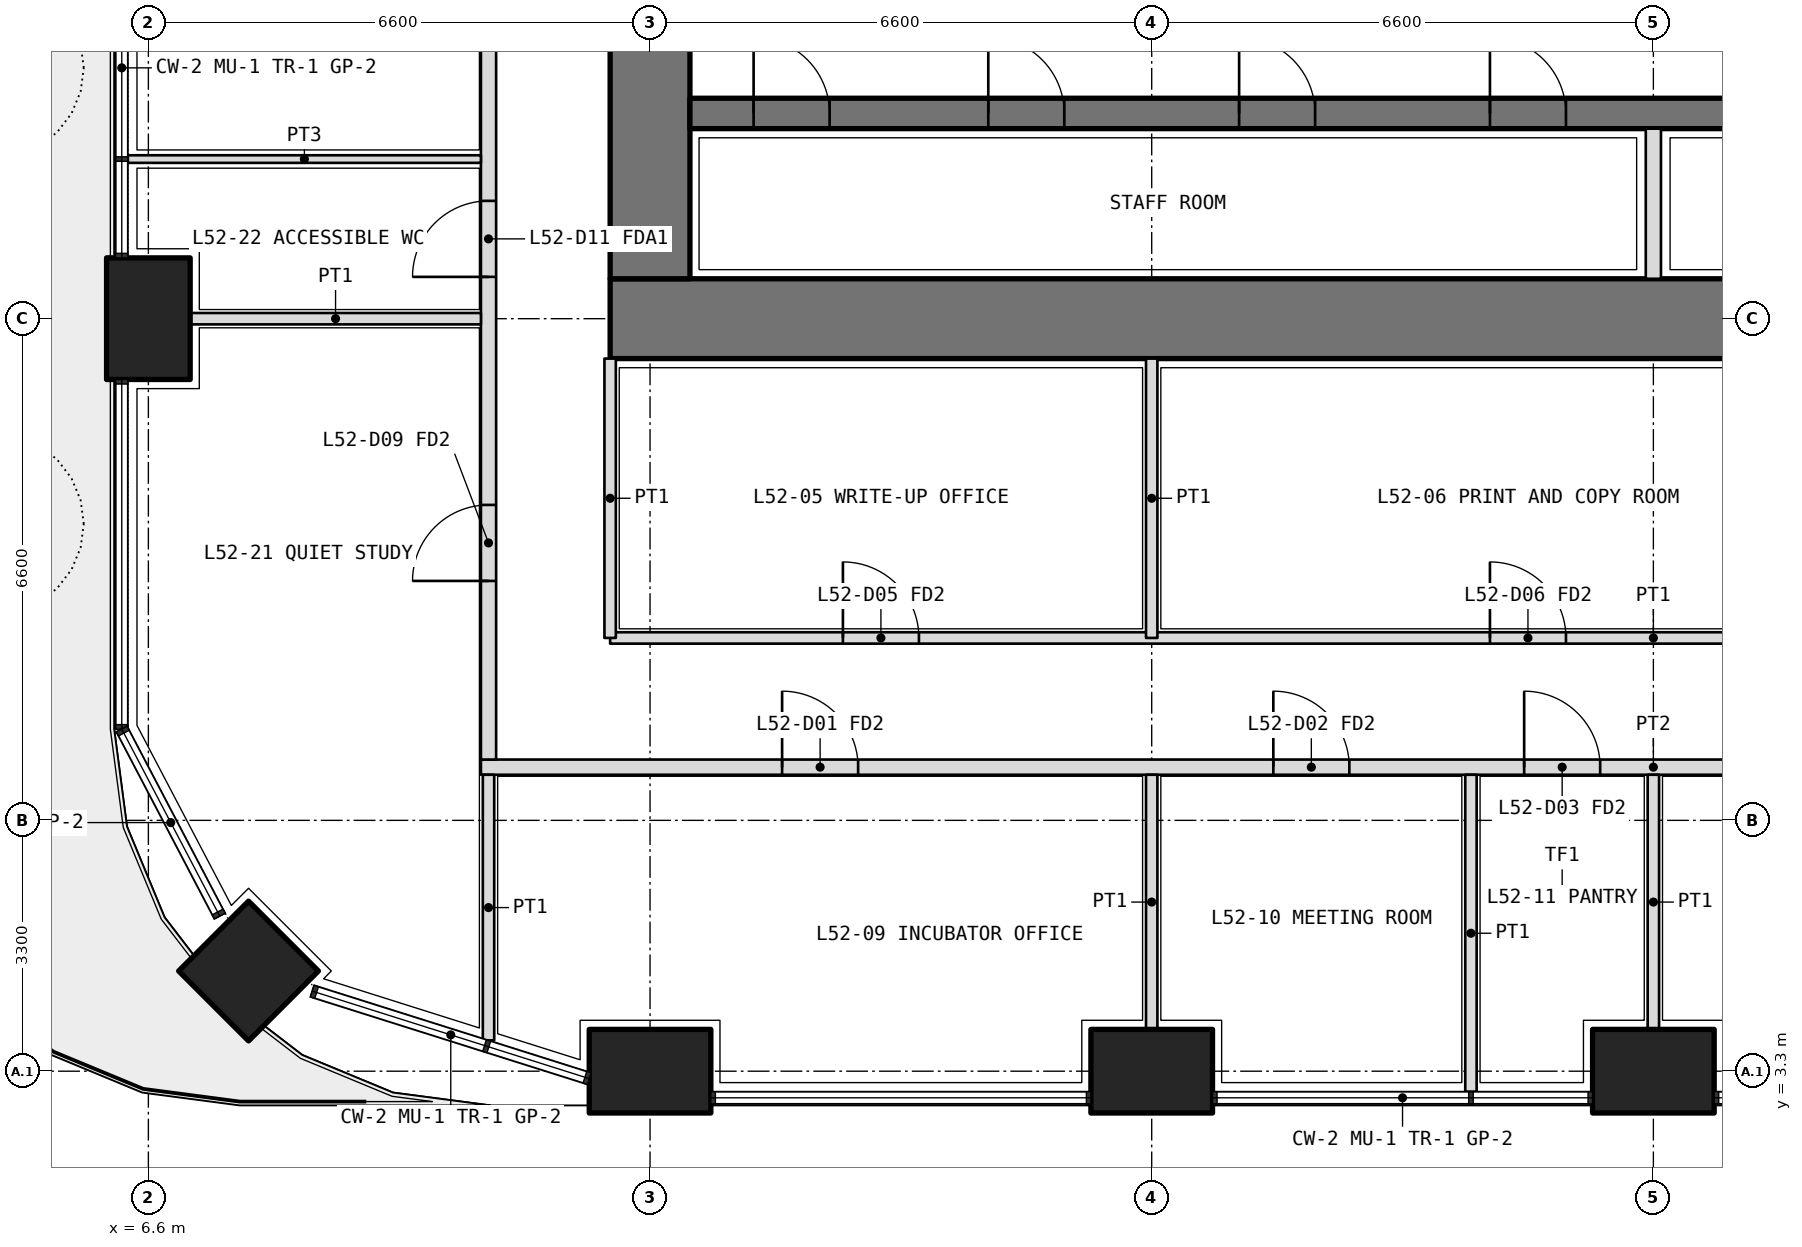
"""IFC4 building model, lengths in metres.
Left out: names, types, materials, properties, quantities, classifications, styles, units other than length and angle.
Written with IfcOpenShell. Run it as: python <this file> out.ifc"""

import sys

from ifc_helpers import new_model, si_unit, direction, frame, frame_2d, origin, origin_2d, place, context, subcontext, project, spatial, rectangle, extrude, element, fill, save


model = new_model("IFC4")
c1 = context("Model", 3, precision=1e-05, world=origin(), true_north=direction((0.0, 1.0)))
c2 = subcontext(c1, "Body", "Model", "MODEL_VIEW")
j1 = project(units=[si_unit("LENGTHUNIT", "METRE"), si_unit("PLANEANGLEUNIT", "RADIAN")], contexts=[c1])
p1 = place(None, origin())
s1 = spatial("IfcSite", under=j1, at=p1, CompositionType="ELEMENT")
p2 = place(p1, origin())
s2 = spatial("IfcBuilding", under=s1, at=p2, CompositionType="ELEMENT")
p3 = place(p2, frame((0.0, 0.0, 229.2)))
s3 = spatial("IfcBuildingStorey", under=s2, at=p3, CompositionType="ELEMENT", Elevation=229.2)
p4 = place(p3, frame((7.918, 4.618, 0.0), z_axis=(0.0, 0.0, 1.0), x_axis=(0.707106781187, 0.707106781187, 0.0)))
e1 = element("IfcColumn", 1, at=p4, inside=s3, PredefinedType="COLUMN", context=c2, shape_type="SweptSolid", body=[
    extrude(rectangle(XDim=1.3, YDim=1.3, at=origin_2d()), origin(), (0.0, 0.0, 1.0), 4.2),
])
for number, where, z_axis, x_axis in (
    (2, (13.2, 3.3, 0.0), (0.0, 0.0, 1.0), (1.0, 0.0, 0.0)),
    (3, (19.8, 3.3, 0.0), (0.0, 0.0, 1.0), (1.0, 0.0, 0.0)),
    (4, (26.4, 3.3, 0.0), (0.0, 0.0, 1.0), (1.0, 0.0, 0.0)),
    (5, (6.6, 13.2, 0.0), (0.0, 0.0, 1.0), (0.0, 1.0, 0.0)),
):
    element("IfcColumn", number, at=place(p3, frame(where, z_axis=z_axis, x_axis=x_axis)), inside=s3, PredefinedType="COLUMN", context=c2, shape_type="SweptSolid", body=[
        extrude(rectangle(XDim=1.6, YDim=1.1, at=origin_2d()), origin(), (0.0, 0.0, 1.0), 4.2),
    ])
p5 = place(p3, frame((12.675, 13.2, 0.0), z_axis=(0.0, 0.0, 1.0), x_axis=(1.0, 0.0, 0.0)))
e6 = element("IfcWall", 6, at=p5, inside=s3, PredefinedType="SHEAR", context=c2, shape_type="SweptSolid", body=[
    extrude(rectangle(XDim=27.45, YDim=1.05, at=frame_2d((13.725, 0.0))), origin(), (0.0, 0.0, 1.0), 4.2),
])
p6 = place(p3, frame((13.2, 32.475, 0.0), z_axis=(0.0, 0.0, 1.0), x_axis=(0.0, -1.0, 0.0)))
e7 = element("IfcWall", 7, at=p6, inside=s3, PredefinedType="SHEAR", context=c2, shape_type="SweptSolid", body=[
    extrude(rectangle(XDim=18.75, YDim=1.05, at=frame_2d((9.375, 0.0))), origin(), (0.0, 0.0, 1.0), 4.2),
])
p7 = place(p6, frame((14.125, 0.0, 0.0)))
e8 = element("IfcOpeningElement", 8, at=p7, cuts=e7, PredefinedType="OPENING", context=c2, shape_type="SweptSolid", body=[
    extrude(rectangle(XDim=1.6, YDim=2.1, at=frame_2d((0.8, 1.05))), frame((0.0, 0.535, 0.0), z_axis=(0.0, -1.0, 0.0), x_axis=(1.0, 0.0, 0.0)), (0.0, 0.0, 1.0), 1.07),
])
p8 = place(p6, frame((3.325, 0.0, 0.0)))
e9 = element("IfcOpeningElement", 9, at=p8, cuts=e7, PredefinedType="OPENING", context=c2, shape_type="SweptSolid", body=[
    extrude(rectangle(XDim=1.6, YDim=2.1, at=frame_2d((0.8, 1.05))), frame((0.0, 0.535, 0.0), z_axis=(0.0, -1.0, 0.0), x_axis=(1.0, 0.0, 0.0)), (0.0, 0.0, 1.0), 1.07),
])
p9 = place(p3, frame((13.725, 15.9, 0.0), z_axis=(0.0, 0.0, 1.0), x_axis=(1.0, 0.0, 0.0)))
e10 = element("IfcWall", 10, at=p9, inside=s3, PredefinedType="SHEAR", context=c2, shape_type="SweptSolid", body=[
    extrude(rectangle(XDim=25.35, YDim=0.4, at=frame_2d((12.675, 0.0))), origin(), (0.0, 0.0, 1.0), 4.2),
])
p10 = place(p9, frame((0.837, 0.0, 0.0)))
e11 = element("IfcOpeningElement", 11, at=p10, cuts=e10, PredefinedType="OPENING", context=c2, shape_type="SweptSolid", body=[
    extrude(rectangle(XDim=1.0, YDim=2.1, at=frame_2d((0.5, 1.05))), frame((0.0, 0.21, 0.0), z_axis=(0.0, -1.0, 0.0), x_axis=(1.0, 0.0, 0.0)), (0.0, 0.0, 1.0), 0.42),
])
p11 = place(p9, frame((3.925, 0.0, 0.0)))
e12 = element("IfcOpeningElement", 12, at=p11, cuts=e10, PredefinedType="OPENING", context=c2, shape_type="SweptSolid", body=[
    extrude(rectangle(XDim=1.0, YDim=2.1, at=frame_2d((0.5, 1.05))), frame((0.0, 0.21, 0.0), z_axis=(0.0, -1.0, 0.0), x_axis=(1.0, 0.0, 0.0)), (0.0, 0.0, 1.0), 0.42),
])
p12 = place(p9, frame((7.225, 0.0, 0.0)))
e13 = element("IfcOpeningElement", 13, at=p12, cuts=e10, PredefinedType="OPENING", context=c2, shape_type="SweptSolid", body=[
    extrude(rectangle(XDim=1.0, YDim=2.1, at=frame_2d((0.5, 1.05))), frame((0.0, 0.21, 0.0), z_axis=(0.0, -1.0, 0.0), x_axis=(1.0, 0.0, 0.0)), (0.0, 0.0, 1.0), 0.42),
])
p13 = place(p9, frame((10.525, 0.0, 0.0)))
e14 = element("IfcOpeningElement", 14, at=p13, cuts=e10, PredefinedType="OPENING", context=c2, shape_type="SweptSolid", body=[
    extrude(rectangle(XDim=1.0, YDim=2.1, at=frame_2d((0.5, 1.05))), frame((0.0, 0.21, 0.0), z_axis=(0.0, -1.0, 0.0), x_axis=(1.0, 0.0, 0.0)), (0.0, 0.0, 1.0), 0.42),
])
p14 = place(p9, frame((13.825, 0.0, 0.0)))
e15 = element("IfcOpeningElement", 15, at=p14, cuts=e10, PredefinedType="OPENING", context=c2, shape_type="SweptSolid", body=[
    extrude(rectangle(XDim=1.0, YDim=2.1, at=frame_2d((0.5, 1.05))), frame((0.0, 0.21, 0.0), z_axis=(0.0, -1.0, 0.0), x_axis=(1.0, 0.0, 0.0)), (0.0, 0.0, 1.0), 0.42),
])
p15 = place(p9, frame((17.125, 0.0, 0.0)))
e16 = element("IfcOpeningElement", 16, at=p15, cuts=e10, PredefinedType="OPENING", context=c2, shape_type="SweptSolid", body=[
    extrude(rectangle(XDim=1.0, YDim=2.1, at=frame_2d((0.5, 1.05))), frame((0.0, 0.21, 0.0), z_axis=(0.0, -1.0, 0.0), x_axis=(1.0, 0.0, 0.0)), (0.0, 0.0, 1.0), 0.42),
])
p16 = place(p9, frame((20.425, 0.0, 0.0)))
e17 = element("IfcOpeningElement", 17, at=p16, cuts=e10, PredefinedType="OPENING", context=c2, shape_type="SweptSolid", body=[
    extrude(rectangle(XDim=1.0, YDim=2.1, at=frame_2d((0.5, 1.05))), frame((0.0, 0.21, 0.0), z_axis=(0.0, -1.0, 0.0), x_axis=(1.0, 0.0, 0.0)), (0.0, 0.0, 1.0), 0.42),
])
p17 = place(p9, frame((23.512, 0.0, 0.0)))
e18 = element("IfcOpeningElement", 18, at=p17, cuts=e10, PredefinedType="OPENING", context=c2, shape_type="SweptSolid", body=[
    extrude(rectangle(XDim=1.0, YDim=2.1, at=frame_2d((0.5, 1.05))), frame((0.0, 0.21, 0.0), z_axis=(0.0, -1.0, 0.0), x_axis=(1.0, 0.0, 0.0)), (0.0, 0.0, 1.0), 0.42),
])
p18 = place(p3, frame((26.4, 13.725, 0.0), z_axis=(0.0, 0.0, 1.0), x_axis=(0.0, 1.0, 0.0)))
e19 = element("IfcWall", 19, at=p18, inside=s3, PredefinedType="PARTITIONING", context=c2, shape_type="SweptSolid", body=[
    extrude(rectangle(XDim=1.975, YDim=0.2, at=frame_2d((0.987, 0.0))), origin(), (0.0, 0.0, 1.0), 4.2),
])
p19 = place(p3, frame((12.675, 9.0, 0.0), z_axis=(0.0, 0.0, 1.0), x_axis=(1.0, 0.0, 0.0)))
e20 = element("IfcWall", 20, at=p19, inside=s3, PredefinedType="PARTITIONING", context=c2, shape_type="SweptSolid", body=[
    extrude(rectangle(XDim=27.45, YDim=0.15, at=frame_2d((13.725, 0.0))), origin(), (0.0, 0.0, 1.0), 3.0),
])
p20 = place(p19, frame((3.062, 0.0, 0.0)))
e21 = element("IfcOpeningElement", 21, at=p20, cuts=e20, PredefinedType="OPENING", context=c2, shape_type="SweptSolid", body=[
    extrude(rectangle(XDim=1.0, YDim=2.1, at=frame_2d((0.5, 1.05))), frame((0.0, 0.085, 0.0), z_axis=(0.0, -1.0, 0.0), x_axis=(1.0, 0.0, 0.0)), (0.0, 0.0, 1.0), 0.17),
])
p21 = place(p19, frame((11.575, 0.0, 0.0)))
e22 = element("IfcOpeningElement", 22, at=p21, cuts=e20, PredefinedType="OPENING", context=c2, shape_type="SweptSolid", body=[
    extrude(rectangle(XDim=1.0, YDim=2.1, at=frame_2d((0.5, 1.05))), frame((0.0, 0.085, 0.0), z_axis=(0.0, -1.0, 0.0), x_axis=(1.0, 0.0, 0.0)), (0.0, 0.0, 1.0), 0.17),
])
p22 = place(p19, frame((19.825, 0.0, 0.0)))
e23 = element("IfcOpeningElement", 23, at=p22, cuts=e20, PredefinedType="OPENING", context=c2, shape_type="SweptSolid", body=[
    extrude(rectangle(XDim=1.0, YDim=2.1, at=frame_2d((0.5, 1.05))), frame((0.0, 0.085, 0.0), z_axis=(0.0, -1.0, 0.0), x_axis=(1.0, 0.0, 0.0)), (0.0, 0.0, 1.0), 0.17),
])
p23 = place(p19, frame((25.038, 0.0, 0.0)))
e24 = element("IfcOpeningElement", 24, at=p23, cuts=e20, PredefinedType="OPENING", context=c2, shape_type="SweptSolid", body=[
    extrude(rectangle(XDim=1.0, YDim=2.1, at=frame_2d((0.5, 1.05))), frame((0.0, 0.085, 0.0), z_axis=(0.0, -1.0, 0.0), x_axis=(1.0, 0.0, 0.0)), (0.0, 0.0, 1.0), 0.17),
])
for number, where, z_axis, x_axis in (
    (25, (12.675, 12.675, 0.0), (0.0, 0.0, 1.0), (0.0, -1.0, 0.0)),
    (26, (19.8, 12.675, 0.0), (0.0, 0.0, 1.0), (0.0, -1.0, 0.0)),
):
    element("IfcWall", number, at=place(p3, frame(where, z_axis=z_axis, x_axis=x_axis)), inside=s3, PredefinedType="PARTITIONING", context=c2, shape_type="SweptSolid", body=[
        extrude(rectangle(XDim=3.675, YDim=0.15, at=frame_2d((1.837, 0.0))), origin(), (0.0, 0.0, 1.0), 3.0),
    ])
p24 = place(p3, frame((10.975, 7.3, 0.0), z_axis=(0.0, 0.0, 1.0), x_axis=(1.0, 0.0, 0.0)))
e27 = element("IfcWall", 27, at=p24, inside=s3, PredefinedType="PARTITIONING", context=c2, shape_type="SweptSolid", body=[
    extrude(rectangle(XDim=30.85, YDim=0.2, at=frame_2d((15.425, 0.0))), origin(), (0.0, 0.0, 1.0), 3.0),
])
p25 = place(p24, frame((3.962, 0.0, 0.0)))
e28 = element("IfcOpeningElement", 28, at=p25, cuts=e27, PredefinedType="OPENING", context=c2, shape_type="SweptSolid", body=[
    extrude(rectangle(XDim=1.0, YDim=2.1, at=frame_2d((0.5, 1.05))), frame((0.0, 0.11, 0.0), z_axis=(0.0, -1.0, 0.0), x_axis=(1.0, 0.0, 0.0)), (0.0, 0.0, 1.0), 0.22),
])
p26 = place(p24, frame((10.425, 0.0, 0.0)))
e29 = element("IfcOpeningElement", 29, at=p26, cuts=e27, PredefinedType="OPENING", context=c2, shape_type="SweptSolid", body=[
    extrude(rectangle(XDim=1.0, YDim=2.1, at=frame_2d((0.5, 1.05))), frame((0.0, 0.11, 0.0), z_axis=(0.0, -1.0, 0.0), x_axis=(1.0, 0.0, 0.0)), (0.0, 0.0, 1.0), 0.22),
])
p27 = place(p24, frame((13.725, 0.0, 0.0)))
e30 = element("IfcOpeningElement", 30, at=p27, cuts=e27, PredefinedType="OPENING", context=c2, shape_type="SweptSolid", body=[
    extrude(rectangle(XDim=1.0, YDim=2.1, at=frame_2d((0.5, 1.05))), frame((0.0, 0.11, 0.0), z_axis=(0.0, -1.0, 0.0), x_axis=(1.0, 0.0, 0.0)), (0.0, 0.0, 1.0), 0.22),
])
p28 = place(p24, frame((22.587, 0.0, 0.0)))
e31 = element("IfcOpeningElement", 31, at=p28, cuts=e27, PredefinedType="OPENING", context=c2, shape_type="SweptSolid", body=[
    extrude(rectangle(XDim=1.0, YDim=2.1, at=frame_2d((0.5, 1.05))), frame((0.0, 0.11, 0.0), z_axis=(0.0, -1.0, 0.0), x_axis=(1.0, 0.0, 0.0)), (0.0, 0.0, 1.0), 0.22),
])
p29 = place(p3, frame((11.075, 7.4, 0.0), z_axis=(0.0, 0.0, 1.0), x_axis=(0.0, 1.0, 0.0)))
e32 = element("IfcWall", 32, at=p29, inside=s3, PredefinedType="PARTITIONING", context=c2, shape_type="SweptSolid", body=[
    extrude(rectangle(XDim=31.4, YDim=0.2, at=frame_2d((15.7, 0.0))), origin(), (0.0, 0.0, 1.0), 3.0),
])
p30 = place(p29, frame((2.35, 0.0, 0.0)))
e33 = element("IfcOpeningElement", 33, at=p30, cuts=e32, PredefinedType="OPENING", context=c2, shape_type="SweptSolid", body=[
    extrude(rectangle(XDim=1.0, YDim=2.1, at=frame_2d((0.5, 1.05))), frame((0.0, 0.11, 0.0), z_axis=(0.0, -1.0, 0.0), x_axis=(1.0, 0.0, 0.0)), (0.0, 0.0, 1.0), 0.22),
])
p31 = place(p29, frame((6.35, 0.0, 0.0)))
e34 = element("IfcOpeningElement", 34, at=p31, cuts=e32, PredefinedType="OPENING", context=c2, shape_type="SweptSolid", body=[
    extrude(rectangle(XDim=1.0, YDim=2.1, at=frame_2d((0.5, 1.05))), frame((0.0, 0.11, 0.0), z_axis=(0.0, -1.0, 0.0), x_axis=(1.0, 0.0, 0.0)), (0.0, 0.0, 1.0), 0.22),
])
p32 = place(p29, frame((9.45, 0.0, 0.0)))
e35 = element("IfcOpeningElement", 35, at=p32, cuts=e32, PredefinedType="OPENING", context=c2, shape_type="SweptSolid", body=[
    extrude(rectangle(XDim=0.9, YDim=2.1, at=frame_2d((0.45, 1.05))), frame((0.0, 0.11, 0.0), z_axis=(0.0, -1.0, 0.0), x_axis=(1.0, 0.0, 0.0)), (0.0, 0.0, 1.0), 0.22),
])
p33 = place(p29, frame((13.35, 0.0, 0.0)))
e36 = element("IfcOpeningElement", 36, at=p33, cuts=e32, PredefinedType="OPENING", context=c2, shape_type="SweptSolid", body=[
    extrude(rectangle(XDim=0.9, YDim=2.1, at=frame_2d((0.45, 1.05))), frame((0.0, 0.11, 0.0), z_axis=(0.0, -1.0, 0.0), x_axis=(1.0, 0.0, 0.0)), (0.0, 0.0, 1.0), 0.22),
])
p34 = place(p29, frame((16.85, 0.0, 0.0)))
e37 = element("IfcOpeningElement", 37, at=p34, cuts=e32, PredefinedType="OPENING", context=c2, shape_type="SweptSolid", body=[
    extrude(rectangle(XDim=1.0, YDim=2.1, at=frame_2d((0.5, 1.05))), frame((0.0, 0.11, 0.0), z_axis=(0.0, -1.0, 0.0), x_axis=(1.0, 0.0, 0.0)), (0.0, 0.0, 1.0), 0.22),
])
p35 = place(p29, frame((21.8, 0.0, 0.0)))
e38 = element("IfcOpeningElement", 38, at=p35, cuts=e32, PredefinedType="OPENING", context=c2, shape_type="SweptSolid", body=[
    extrude(rectangle(XDim=1.0, YDim=2.1, at=frame_2d((0.5, 1.05))), frame((0.0, 0.11, 0.0), z_axis=(0.0, -1.0, 0.0), x_axis=(1.0, 0.0, 0.0)), (0.0, 0.0, 1.0), 0.22),
])
p36 = place(p29, frame((28.05, 0.0, 0.0)))
e39 = element("IfcOpeningElement", 39, at=p36, cuts=e32, PredefinedType="OPENING", context=c2, shape_type="SweptSolid", body=[
    extrude(rectangle(XDim=1.0, YDim=2.1, at=frame_2d((0.5, 1.05))), frame((0.0, 0.11, 0.0), z_axis=(0.0, -1.0, 0.0), x_axis=(1.0, 0.0, 0.0)), (0.0, 0.0, 1.0), 0.22),
])
p37 = place(p3, frame((11.075, 3.705, 0.0), z_axis=(0.0, 0.0, 1.0), x_axis=(0.0, 1.0, 0.0)))
e40 = element("IfcWall", 40, at=p37, inside=s3, PredefinedType="PARTITIONING", context=c2, shape_type="SweptSolid", body=[
    extrude(rectangle(XDim=3.495, YDim=0.15, at=frame_2d((1.748, 0.0))), origin(), (0.0, 0.0, 1.0), 2.7),
])
p38 = place(p3, frame((24.0, 3.03, 0.0), z_axis=(0.0, 0.0, 1.0), x_axis=(0.0, 1.0, 0.0)))
e41 = element("IfcWall", 41, at=p38, inside=s3, PredefinedType="PARTITIONING", context=c2, shape_type="SweptSolid", body=[
    extrude(rectangle(XDim=4.17, YDim=0.15, at=frame_2d((2.085, 0.0))), origin(), (0.0, 0.0, 1.0), 2.7),
])
for number, where, z_axis, x_axis in (
    (42, (26.4, 3.85, 0.0), (0.0, 0.0, 1.0), (0.0, 1.0, 0.0)),
    (43, (19.8, 3.85, 0.0), (0.0, 0.0, 1.0), (0.0, 1.0, 0.0)),
):
    element("IfcWall", number, at=place(p3, frame(where, z_axis=z_axis, x_axis=x_axis)), inside=s3, PredefinedType="PARTITIONING", context=c2, shape_type="SweptSolid", body=[
        extrude(rectangle(XDim=3.35, YDim=0.15, at=frame_2d((1.675, 0.0))), origin(), (0.0, 0.0, 1.0), 3.0),
    ])
p39 = place(p3, frame((6.33, 15.3, 0.0), z_axis=(0.0, 0.0, 1.0), x_axis=(1.0, 0.0, 0.0)))
e44 = element("IfcWall", 44, at=p39, inside=s3, PredefinedType="PARTITIONING", context=c2, shape_type="SweptSolid", body=[
    extrude(rectangle(XDim=4.645, YDim=0.1, at=frame_2d((2.323, 0.0))), origin(), (0.0, 0.0, 1.0), 2.7),
])
p40 = place(p3, frame((7.15, 13.2, 0.0), z_axis=(0.0, 0.0, 1.0), x_axis=(1.0, 0.0, 0.0)))
e45 = element("IfcWall", 45, at=p40, inside=s3, PredefinedType="PARTITIONING", context=c2, shape_type="SweptSolid", body=[
    extrude(rectangle(XDim=3.825, YDim=0.15, at=frame_2d((1.913, 0.0))), origin(), (0.0, 0.0, 1.0), 3.0),
])
p41 = place(p20, origin())
e46 = element("IfcDoor", 46, at=p41, inside=s3, OperationType="SINGLE_SWING_LEFT", PredefinedType="DOOR", context=c2, shape_type="SweptSolid", body=[
    extrude(rectangle(XDim=1.0, YDim=2.1, at=frame_2d((0.5, 1.05))), frame((0.0, 0.025, 0.0), z_axis=(0.0, -1.0, 0.0), x_axis=(1.0, 0.0, 0.0)), (0.0, 0.0, 1.0), 0.05),
])
fill(e21, e46)
p42 = place(p21, origin())
e47 = element("IfcDoor", 47, at=p42, inside=s3, OperationType="SINGLE_SWING_LEFT", PredefinedType="DOOR", context=c2, shape_type="SweptSolid", body=[
    extrude(rectangle(XDim=1.0, YDim=2.1, at=frame_2d((0.5, 1.05))), frame((0.0, 0.025, 0.0), z_axis=(0.0, -1.0, 0.0), x_axis=(1.0, 0.0, 0.0)), (0.0, 0.0, 1.0), 0.05),
])
fill(e22, e47)
p43 = place(p25, origin())
e48 = element("IfcDoor", 48, at=p43, inside=s3, OperationType="SINGLE_SWING_LEFT", PredefinedType="DOOR", context=c2, shape_type="SweptSolid", body=[
    extrude(rectangle(XDim=1.0, YDim=2.1, at=frame_2d((0.5, 1.05))), frame((0.0, 0.025, 0.0), z_axis=(0.0, -1.0, 0.0), x_axis=(1.0, 0.0, 0.0)), (0.0, 0.0, 1.0), 0.05),
])
fill(e28, e48)
p44 = place(p26, origin())
e49 = element("IfcDoor", 49, at=p44, inside=s3, OperationType="SINGLE_SWING_LEFT", PredefinedType="DOOR", context=c2, shape_type="SweptSolid", body=[
    extrude(rectangle(XDim=1.0, YDim=2.1, at=frame_2d((0.5, 1.05))), frame((0.0, 0.025, 0.0), z_axis=(0.0, -1.0, 0.0), x_axis=(1.0, 0.0, 0.0)), (0.0, 0.0, 1.0), 0.05),
])
fill(e29, e49)
p45 = place(p27, origin())
e50 = element("IfcDoor", 50, at=p45, inside=s3, OperationType="SINGLE_SWING_LEFT", PredefinedType="DOOR", context=c2, shape_type="SweptSolid", body=[
    extrude(rectangle(XDim=1.0, YDim=2.1, at=frame_2d((0.5, 1.05))), frame((0.0, 0.025, 0.0), z_axis=(0.0, -1.0, 0.0), x_axis=(1.0, 0.0, 0.0)), (0.0, 0.0, 1.0), 0.05),
])
fill(e30, e50)
p46 = place(p30, origin())
e51 = element("IfcDoor", 51, at=p46, inside=s3, OperationType="SINGLE_SWING_LEFT", PredefinedType="DOOR", context=c2, shape_type="SweptSolid", body=[
    extrude(rectangle(XDim=1.0, YDim=2.1, at=frame_2d((0.5, 1.05))), frame((0.0, 0.025, 0.0), z_axis=(0.0, -1.0, 0.0), x_axis=(1.0, 0.0, 0.0)), (0.0, 0.0, 1.0), 0.05),
])
fill(e33, e51)
p47 = place(p31, origin())
e52 = element("IfcDoor", 52, at=p47, inside=s3, OperationType="SINGLE_SWING_LEFT", PredefinedType="DOOR", context=c2, shape_type="SweptSolid", body=[
    extrude(rectangle(XDim=1.0, YDim=2.1, at=frame_2d((0.5, 1.05))), frame((0.0, 0.025, 0.0), z_axis=(0.0, -1.0, 0.0), x_axis=(1.0, 0.0, 0.0)), (0.0, 0.0, 1.0), 0.05),
])
fill(e34, e52)
p48 = place(p10, origin())
e53 = element("IfcDoor", 53, at=p48, inside=s3, OperationType="SINGLE_SWING_LEFT", PredefinedType="DOOR", context=c2, shape_type="SweptSolid", body=[
    extrude(rectangle(XDim=1.0, YDim=2.1, at=frame_2d((0.5, 1.05))), frame((0.0, 0.025, 0.0), z_axis=(0.0, -1.0, 0.0), x_axis=(1.0, 0.0, 0.0)), (0.0, 0.0, 1.0), 0.05),
])
fill(e11, e53)
p49 = place(p11, origin())
e54 = element("IfcDoor", 54, at=p49, inside=s3, OperationType="SINGLE_SWING_LEFT", PredefinedType="DOOR", context=c2, shape_type="SweptSolid", body=[
    extrude(rectangle(XDim=1.0, YDim=2.1, at=frame_2d((0.5, 1.05))), frame((0.0, 0.025, 0.0), z_axis=(0.0, -1.0, 0.0), x_axis=(1.0, 0.0, 0.0)), (0.0, 0.0, 1.0), 0.05),
])
fill(e12, e54)
p50 = place(p12, origin())
e55 = element("IfcDoor", 55, at=p50, inside=s3, OperationType="SINGLE_SWING_LEFT", PredefinedType="DOOR", context=c2, shape_type="SweptSolid", body=[
    extrude(rectangle(XDim=1.0, YDim=2.1, at=frame_2d((0.5, 1.05))), frame((0.0, 0.025, 0.0), z_axis=(0.0, -1.0, 0.0), x_axis=(1.0, 0.0, 0.0)), (0.0, 0.0, 1.0), 0.05),
])
fill(e13, e55)
p51 = place(p13, origin())
e56 = element("IfcDoor", 56, at=p51, inside=s3, OperationType="SINGLE_SWING_LEFT", PredefinedType="DOOR", context=c2, shape_type="SweptSolid", body=[
    extrude(rectangle(XDim=1.0, YDim=2.1, at=frame_2d((0.5, 1.05))), frame((0.0, 0.025, 0.0), z_axis=(0.0, -1.0, 0.0), x_axis=(1.0, 0.0, 0.0)), (0.0, 0.0, 1.0), 0.05),
])
fill(e14, e56)
save(model, sys.argv[1])
